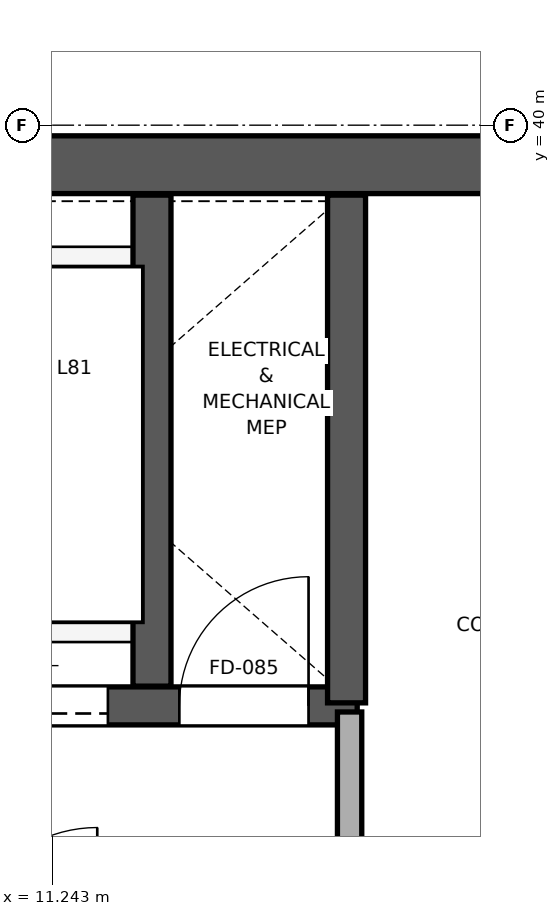
"""IFC4 building model, lengths in metres.
Left out: names, types, materials, properties, quantities, classifications, styles, units other than length and angle.
Written with IfcOpenShell. Run it as: python <this file> out.ifc"""

import sys

from ifc_helpers import new_model, si_unit, direction, frame, frame_2d, origin, place, context, subcontext, project, spatial, rectangle, extrude, source, transform, mapped, element, fill, save


model = new_model("IFC4")
c1 = context("Model", 3, precision=1e-05, world=origin(), true_north=direction((0.0, 1.0)))
c2 = subcontext(c1, "Body", "Model", "MODEL_VIEW")
j1 = project(units=[si_unit("LENGTHUNIT", "METRE"), si_unit("PLANEANGLEUNIT", "RADIAN")], contexts=[c1])
p1 = place(None, origin())
s1 = spatial("IfcSite", under=j1, at=p1, CompositionType="ELEMENT")
p2 = place(p1, origin())
s2 = spatial("IfcBuilding", under=s1, at=p2, CompositionType="ELEMENT")
p3 = place(p2, frame((0.0, 0.0, 360.0)))
s3 = spatial("IfcBuildingStorey", under=s2, at=p3, CompositionType="ELEMENT", Elevation=360.0)
p4 = place(p3, frame((9.07, 39.74, 0.0), z_axis=(0.0, 0.0, 1.0), x_axis=(1.0, 0.0, 0.0)))
e1 = element("IfcWall", 1, at=p4, inside=s3, PredefinedType="SHEAR", context=c2, shape_type="SweptSolid", body=[
    extrude(rectangle(XDim=17.86, YDim=0.38, at=frame_2d((8.93, 0.0))), origin(), (0.0, 0.0, 1.0), 5.72),
])
p5 = place(p3, frame((9.46, 36.18, 0.0), z_axis=(0.0, 0.0, 1.0), x_axis=(1.0, 0.0, 0.0)))
e2 = element("IfcWall", 2, at=p5, inside=s3, PredefinedType="SHEAR", context=c2, shape_type="SweptSolid", body=[
    extrude(rectangle(XDim=3.79, YDim=0.25, at=frame_2d((1.895, 0.0))), origin(), (0.0, 0.0, 1.0), 5.72),
])
p6 = place(p5, frame((2.62, 0.0, 0.0)))
e3 = element("IfcOpeningElement", 3, at=p6, cuts=e2, PredefinedType="OPENING", context=c2, shape_type="SweptSolid", body=[
    extrude(rectangle(XDim=0.85, YDim=2.1, at=frame_2d((0.425, 1.05))), frame((0.0, 0.135, 0.0), z_axis=(0.0, -1.0, 0.0), x_axis=(1.0, 0.0, 0.0)), (0.0, 0.0, 1.0), 0.27),
])
p7 = place(p5, frame((0.85, 0.0, 0.0)))
e4 = element("IfcOpeningElement", 4, at=p7, cuts=e2, PredefinedType="OPENING", context=c2, shape_type="SweptSolid", body=[
    extrude(rectangle(XDim=1.3, YDim=2.25, at=frame_2d((0.65, 1.125))), frame((0.0, 0.135, 0.0), z_axis=(0.0, -1.0, 0.0), x_axis=(1.0, 0.0, 0.0)), (0.0, 0.0, 1.0), 0.27),
])
p8 = place(p3, frame((11.9, 36.31, 0.0), z_axis=(0.0, 0.0, 1.0), x_axis=(0.0, 1.0, 0.0)))
e5 = element("IfcWall", 5, at=p8, inside=s3, PredefinedType="SHEAR", context=c2, shape_type="SweptSolid", body=[
    extrude(rectangle(XDim=3.23, YDim=0.25, at=frame_2d((1.615, 0.0))), origin(), (0.0, 0.0, 1.0), 5.72),
])
p9 = place(p3, frame((13.18, 36.2, 0.0), z_axis=(0.0, 0.0, 1.0), x_axis=(0.0, 1.0, 0.0)))
e6 = element("IfcWall", 6, at=p9, inside=s3, PredefinedType="SHEAR", context=c2, shape_type="SweptSolid", body=[
    extrude(rectangle(XDim=3.34, YDim=0.25, at=frame_2d((1.67, 0.0))), origin(), (0.0, 0.0, 1.0), 5.72),
])
p10 = place(p3, frame((13.2, 34.57, 0.0), z_axis=(0.0, 0.0, 1.0), x_axis=(0.0, 1.0, 0.0)))
e7 = element("IfcWall", 7, at=p10, inside=s3, PredefinedType="PARTITIONING", context=c2, shape_type="SweptSolid", body=[
    extrude(rectangle(XDim=1.57, YDim=0.16, at=frame_2d((0.785, 0.0))), origin(), (0.0, 0.0, 1.0), 5.72),
])
m1 = source(origin(), c2, "Body", "SweptSolid", [
    extrude(rectangle(XDim=0.85, YDim=2.1, at=frame_2d((0.425, 1.05))), frame((0.0, 0.025, 0.0), z_axis=(0.0, -1.0, 0.0), x_axis=(1.0, 0.0, 0.0)), (0.0, 0.0, 1.0), 0.05),
])
p11 = place(p6, origin())
e8 = element("IfcDoor", 8, at=p11, inside=s3, OperationType="SINGLE_SWING_RIGHT", PredefinedType="DOOR", context=c2, shape_type="MappedRepresentation", body=[
    mapped(m1, transform((0.0, 0.0, 0.0), scale=1.0)),
])
fill(e3, e8)
m2 = source(origin(), c2, "Body", "SweptSolid", [
    extrude(rectangle(XDim=1.3, YDim=2.25, at=frame_2d((0.65, 1.125))), frame((0.0, 0.025, 0.0), z_axis=(0.0, -1.0, 0.0), x_axis=(1.0, 0.0, 0.0)), (0.0, 0.0, 1.0), 0.05),
])
p12 = place(p7, origin())
e9 = element("IfcDoor", 9, at=p12, inside=s3, OperationType="SLIDING_TO_LEFT", PredefinedType="DOOR", context=c2, shape_type="MappedRepresentation", body=[
    mapped(m2, transform((0.0, 0.0, 0.0), scale=1.0)),
])
fill(e4, e9)
save(model, sys.argv[1])
